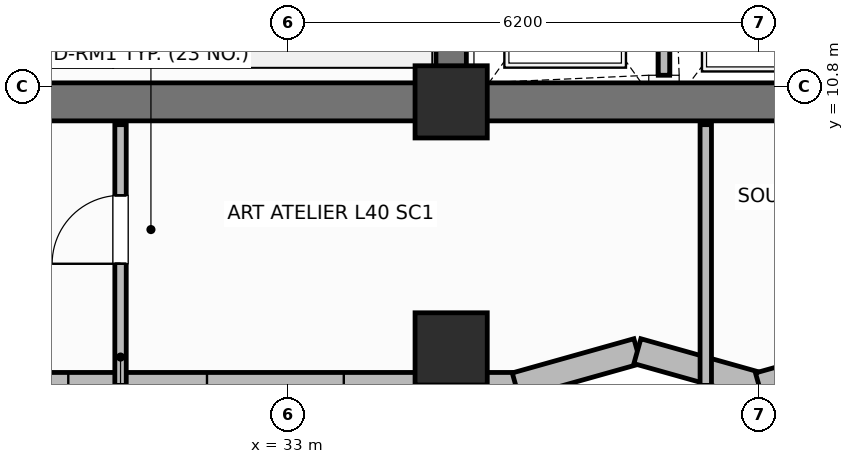
"""IFC4 building model, lengths in metres.
Left out: names, types, materials, properties, quantities, classifications, styles, units other than length and angle.
Written with IfcOpenShell. Run it as: python <this file> out.ifc"""

import sys

from ifc_helpers import new_model, si_unit, direction, frame, frame_2d, origin, origin_2d, place, context, subcontext, project, spatial, rectangle, extrude, element, fill, save


model = new_model("IFC4")
c1 = context("Model", 3, precision=1e-05, world=origin(), true_north=direction((0.0, 1.0)))
c2 = subcontext(c1, "Body", "Model", "MODEL_VIEW")
j1 = project(units=[si_unit("LENGTHUNIT", "METRE"), si_unit("PLANEANGLEUNIT", "RADIAN")], contexts=[c1])
p1 = place(None, origin())
s1 = spatial("IfcSite", under=j1, at=p1, CompositionType="ELEMENT")
p2 = place(p1, origin())
s2 = spatial("IfcBuilding", under=s1, at=p2, CompositionType="ELEMENT")
p3 = place(p2, frame((0.0, 0.0, 162.6)))
s3 = spatial("IfcBuildingStorey", under=s2, at=p3, CompositionType="ELEMENT", Elevation=162.6)
p4 = place(p3, frame((52.8, 10.6, 0.0), z_axis=(0.0, 0.0, 1.0), x_axis=(-1.0, 0.0, 0.0)))
e1 = element("IfcWall", 1, at=p4, inside=s3, PredefinedType="SHEAR", context=c2, shape_type="SweptSolid", body=[
    extrude(rectangle(XDim=27.2, YDim=0.5, at=frame_2d((13.6, 0.0))), origin(), (0.0, 0.0, 1.0), 3.7),
])
p5 = place(p3, frame((35.15, 10.85, 0.0), z_axis=(0.0, 0.0, 1.0), x_axis=(0.0, 1.0, 0.0)))
e2 = element("IfcWall", 2, at=p5, inside=s3, PredefinedType="SHEAR", context=c2, shape_type="SweptSolid", body=[
    extrude(rectangle(XDim=5.7, YDim=0.4, at=frame_2d((2.85, 0.0))), origin(), (0.0, 0.0, 1.0), 3.7),
])
for number, where, z_axis, x_axis in (
    (3, (35.15, 10.6, 0.0), (0.0, 0.0, 1.0), (1.0, 0.0, 0.0)),
    (4, (35.15, 7.35, 0.0), (0.0, 0.0, 1.0), (1.0, 0.0, 0.0)),
):
    element("IfcColumn", number, at=place(p3, frame(where, z_axis=z_axis, x_axis=x_axis)), inside=s3, PredefinedType="COLUMN", context=c2, shape_type="SweptSolid", body=[
        extrude(rectangle(XDim=0.95, YDim=0.95, at=origin_2d()), origin(), (0.0, 0.0, 1.0), 3.7),
    ])
p6 = place(p3, frame((20.2, 6.87, 0.0), z_axis=(0.0, 0.0, 1.0), x_axis=(1.0, 0.0, 0.0)))
e5 = element("IfcWall", 5, at=p6, inside=s3, PredefinedType="SOLIDWALL", context=c2, shape_type="SweptSolid", body=[
    extrude(rectangle(XDim=15.8, YDim=0.34, at=frame_2d((7.9, 0.0))), origin(), (0.0, 0.0, 1.0), 2.72),
])
p7 = place(p6, frame((0.863, 0.0, 0.75)))
e6 = element("IfcOpeningElement", 6, at=p7, cuts=e5, PredefinedType="OPENING", context=c2, shape_type="SweptSolid", body=[
    extrude(rectangle(XDim=1.8, YDim=1.85, at=frame_2d((0.9, 0.925))), frame((0.0, 0.18, 0.0), z_axis=(0.0, -1.0, 0.0), x_axis=(1.0, 0.0, 0.0)), (0.0, 0.0, 1.0), 0.36),
])
p8 = place(p6, frame((8.113, 0.0, 0.75)))
e7 = element("IfcOpeningElement", 7, at=p8, cuts=e5, PredefinedType="OPENING", context=c2, shape_type="SweptSolid", body=[
    extrude(rectangle(XDim=1.8, YDim=1.85, at=frame_2d((0.9, 0.925))), frame((0.0, 0.18, 0.0), z_axis=(0.0, -1.0, 0.0), x_axis=(1.0, 0.0, 0.0)), (0.0, 0.0, 1.0), 0.36),
])
p9 = place(p6, frame((11.738, 0.0, 0.75)))
e8 = element("IfcOpeningElement", 8, at=p9, cuts=e5, PredefinedType="OPENING", context=c2, shape_type="SweptSolid", body=[
    extrude(rectangle(XDim=1.8, YDim=1.85, at=frame_2d((0.9, 0.925))), frame((0.0, 0.18, 0.0), z_axis=(0.0, -1.0, 0.0), x_axis=(1.0, 0.0, 0.0)), (0.0, 0.0, 1.0), 0.36),
])
p10 = place(p3, frame((36.0, 6.87, 0.0), z_axis=(0.0, 0.0, 1.0), x_axis=(0.962662902433, 0.270703040766, 0.0)))
e9 = element("IfcWall", 9, at=p10, inside=s3, PredefinedType="SOLIDWALL", context=c2, shape_type="SweptSolid", body=[
    extrude(rectangle(XDim=1.662, YDim=0.34, at=frame_2d((0.831, 0.0))), origin(), (0.0, 0.0, 1.0), 2.72),
])
p11 = place(p3, frame((37.6, 7.32, 0.0), z_axis=(0.0, 0.0, 1.0), x_axis=(0.962652136636, -0.270741322725, 0.0)))
e10 = element("IfcWall", 10, at=p11, inside=s3, PredefinedType="SOLIDWALL", context=c2, shape_type="SweptSolid", body=[
    extrude(rectangle(XDim=1.662, YDim=0.34, at=frame_2d((0.831, 0.0))), origin(), (0.0, 0.0, 1.0), 2.72),
])
p12 = place(p3, frame((39.2, 6.87, 0.0), z_axis=(0.0, 0.0, 1.0), x_axis=(0.962662902433, 0.270703040766, 0.0)))
e11 = element("IfcWall", 11, at=p12, inside=s3, PredefinedType="SOLIDWALL", context=c2, shape_type="SweptSolid", body=[
    extrude(rectangle(XDim=1.662, YDim=0.34, at=frame_2d((0.831, 0.0))), origin(), (0.0, 0.0, 1.0), 2.72),
])
p13 = place(p3, frame((37.95, 10.95, 0.0), z_axis=(0.0, 0.0, 1.0), x_axis=(0.0, 1.0, 0.0)))
e12 = element("IfcWall", 12, at=p13, inside=s3, PredefinedType="PARTITIONING", context=c2, shape_type="SweptSolid", body=[
    extrude(rectangle(XDim=2.75, YDim=0.15, at=frame_2d((1.375, 0.0))), origin(), (0.0, 0.0, 1.0), 2.55),
])
p14 = place(p3, frame((30.8, 6.87, 0.0), z_axis=(0.0, 0.0, 1.0), x_axis=(0.0, 1.0, 0.0)))
e13 = element("IfcWall", 13, at=p14, inside=s3, PredefinedType="PARTITIONING", context=c2, shape_type="SweptSolid", body=[
    extrude(rectangle(XDim=3.43, YDim=0.15, at=frame_2d((1.715, 0.0))), origin(), (0.0, 0.0, 1.0), 2.55),
])
p15 = place(p14, frame((1.6, 0.0, 0.0)))
e14 = element("IfcOpeningElement", 14, at=p15, cuts=e13, PredefinedType="OPENING", context=c2, shape_type="SweptSolid", body=[
    extrude(rectangle(XDim=0.9, YDim=2.1, at=frame_2d((0.45, 1.05))), frame((0.0, 0.085, 0.0), z_axis=(0.0, -1.0, 0.0), x_axis=(1.0, 0.0, 0.0)), (0.0, 0.0, 1.0), 0.17),
])
p16 = place(p3, frame((38.5, 6.87, 0.0), z_axis=(0.0, 0.0, 1.0), x_axis=(0.0, 1.0, 0.0)))
e15 = element("IfcWall", 15, at=p16, inside=s3, PredefinedType="PARTITIONING", context=c2, shape_type="SweptSolid", body=[
    extrude(rectangle(XDim=3.43, YDim=0.15, at=frame_2d((1.715, 0.0))), origin(), (0.0, 0.0, 1.0), 2.55),
])
p17 = place(p8, origin())
e16 = element("IfcWindow", 16, at=p17, inside=s3, PartitioningType="SINGLE_PANEL", PredefinedType="WINDOW", context=c2, shape_type="SweptSolid", body=[
    extrude(rectangle(XDim=1.8, YDim=1.85, at=frame_2d((0.9, 0.925))), frame((0.0, 0.03, 0.0), z_axis=(0.0, -1.0, 0.0), x_axis=(1.0, 0.0, 0.0)), (0.0, 0.0, 1.0), 0.06),
])
fill(e7, e16)
p18 = place(p9, origin())
e17 = element("IfcWindow", 17, at=p18, inside=s3, PartitioningType="SINGLE_PANEL", PredefinedType="WINDOW", context=c2, shape_type="SweptSolid", body=[
    extrude(rectangle(XDim=1.8, YDim=1.85, at=frame_2d((0.9, 0.925))), frame((0.0, 0.03, 0.0), z_axis=(0.0, -1.0, 0.0), x_axis=(1.0, 0.0, 0.0)), (0.0, 0.0, 1.0), 0.06),
])
fill(e8, e17)
p19 = place(p15, origin())
e18 = element("IfcDoor", 18, at=p19, inside=s3, OperationType="SINGLE_SWING_LEFT", PredefinedType="DOOR", context=c2, shape_type="SweptSolid", body=[
    extrude(rectangle(XDim=0.9, YDim=2.1, at=frame_2d((0.45, 1.05))), frame((0.0, 0.025, 0.0), z_axis=(0.0, -1.0, 0.0), x_axis=(1.0, 0.0, 0.0)), (0.0, 0.0, 1.0), 0.05),
])
fill(e14, e18)
save(model, sys.argv[1])
